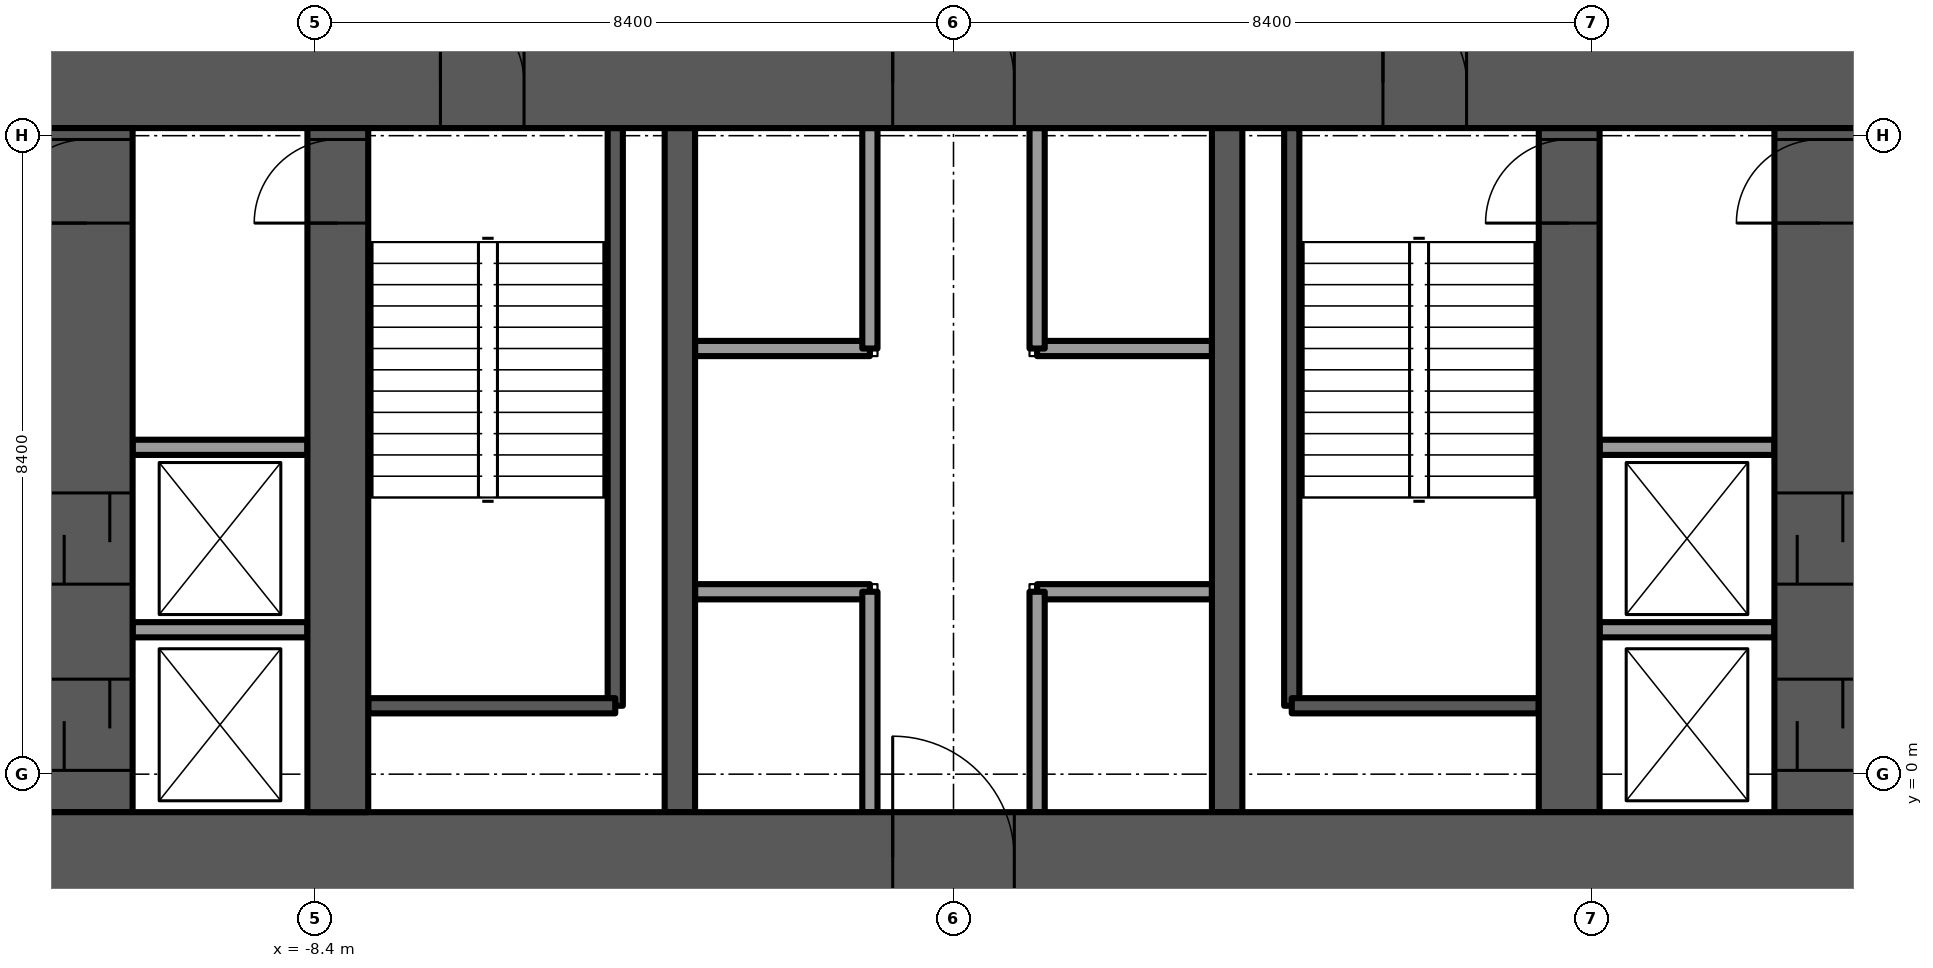
"""IFC4 building model, lengths in metres.
Left out: names, types, materials, properties, quantities, classifications, styles, units other than length and angle.
Written with IfcOpenShell. Run it as: python <this file> out.ifc"""

import sys

from ifc_helpers import new_model, si_unit, direction, frame, frame_2d, origin, place, context, subcontext, project, spatial, rectangle, extrude, element, fill, save


model = new_model("IFC4")
c1 = context("Model", 3, precision=1e-05, world=origin(), true_north=direction((0.0, 1.0)))
c2 = subcontext(c1, "Body", "Model", "MODEL_VIEW")
j1 = project(units=[si_unit("LENGTHUNIT", "METRE"), si_unit("PLANEANGLEUNIT", "RADIAN")], contexts=[c1])
p1 = place(None, origin())
s1 = spatial("IfcSite", under=j1, at=p1, CompositionType="ELEMENT")
p2 = place(p1, origin())
s2 = spatial("IfcBuilding", under=s1, at=p2, CompositionType="ELEMENT")
p3 = place(p2, frame((0.0, 0.0, 19.0)))
s3 = spatial("IfcBuildingStorey", under=s2, at=p3, CompositionType="ELEMENT", Elevation=19.0)
p4 = place(p3, frame((-12.0, -1.1, -0.3), z_axis=(0.0, 0.0, 1.0), x_axis=(1.0, 0.0, 0.0)))
e1 = element("IfcWall", 1, at=p4, inside=s3, PredefinedType="SHEAR", context=c2, shape_type="SweptSolid", body=[
    extrude(rectangle(XDim=24.0, YDim=1.2, at=frame_2d((12.0, 0.0))), origin(), (0.0, 0.0, 1.0), 4.5),
])
p5 = place(p4, frame((11.2, 0.0, 0.0)))
e2 = element("IfcOpeningElement", 2, at=p5, cuts=e1, PredefinedType="OPENING", context=c2, shape_type="SweptSolid", body=[
    extrude(rectangle(XDim=1.6, YDim=2.1, at=frame_2d((0.8, 1.05))), frame((0.0, 0.6, 0.0), z_axis=(0.0, -1.0, 0.0), x_axis=(1.0, 0.0, 0.0)), (0.0, 0.0, 1.0), 1.2),
])
p6 = place(p3, frame((-12.0, 9.1, -0.3), z_axis=(0.0, 0.0, 1.0), x_axis=(1.0, 0.0, 0.0)))
e3 = element("IfcWall", 3, at=p6, inside=s3, PredefinedType="SHEAR", context=c2, shape_type="SweptSolid", body=[
    extrude(rectangle(XDim=24.0, YDim=1.2, at=frame_2d((12.0, 0.0))), origin(), (0.0, 0.0, 1.0), 4.5),
])
p7 = place(p6, frame((11.2, 0.0, 0.0)))
e4 = element("IfcOpeningElement", 4, at=p7, cuts=e3, PredefinedType="OPENING", context=c2, shape_type="SweptSolid", body=[
    extrude(rectangle(XDim=1.6, YDim=2.1, at=frame_2d((0.8, 1.05))), frame((0.0, 0.6, 0.0), z_axis=(0.0, -1.0, 0.0), x_axis=(1.0, 0.0, 0.0)), (0.0, 0.0, 1.0), 1.2),
])
p8 = place(p6, frame((5.25, 0.0, 0.0)))
e5 = element("IfcOpeningElement", 5, at=p8, cuts=e3, PredefinedType="OPENING", context=c2, shape_type="SweptSolid", body=[
    extrude(rectangle(XDim=1.1, YDim=2.1, at=frame_2d((0.55, 1.05))), frame((0.0, 0.6, 0.0), z_axis=(0.0, -1.0, 0.0), x_axis=(1.0, 0.0, 0.0)), (0.0, 0.0, 1.0), 1.2),
])
p9 = place(p6, frame((17.65, 0.0, 0.0)))
e6 = element("IfcOpeningElement", 6, at=p9, cuts=e3, PredefinedType="OPENING", context=c2, shape_type="SweptSolid", body=[
    extrude(rectangle(XDim=1.1, YDim=2.1, at=frame_2d((0.55, 1.05))), frame((0.0, 0.6, 0.0), z_axis=(0.0, -1.0, 0.0), x_axis=(1.0, 0.0, 0.0)), (0.0, 0.0, 1.0), 1.2),
])
p10 = place(p3, frame((-8.1, -0.5, -0.3), z_axis=(0.0, 0.0, 1.0), x_axis=(0.0, 1.0, 0.0)))
e7 = element("IfcWall", 7, at=p10, inside=s3, PredefinedType="SHEAR", context=c2, shape_type="SweptSolid", body=[
    extrude(rectangle(XDim=9.0, YDim=0.8, at=frame_2d((4.5, 0.0))), origin(), (0.0, 0.0, 1.0), 4.5),
])
p11 = place(p10, frame((7.75, 0.0, 0.0)))
e8 = element("IfcOpeningElement", 8, at=p11, cuts=e7, PredefinedType="OPENING", context=c2, shape_type="SweptSolid", body=[
    extrude(rectangle(XDim=1.1, YDim=2.1, at=frame_2d((0.55, 1.05))), frame((0.0, 0.4, 0.0), z_axis=(0.0, -1.0, 0.0), x_axis=(1.0, 0.0, 0.0)), (0.0, 0.0, 1.0), 0.8),
])
p12 = place(p3, frame((8.1, -0.5, -0.3), z_axis=(0.0, 0.0, 1.0), x_axis=(0.0, 1.0, 0.0)))
e9 = element("IfcWall", 9, at=p12, inside=s3, PredefinedType="SHEAR", context=c2, shape_type="SweptSolid", body=[
    extrude(rectangle(XDim=9.0, YDim=0.8, at=frame_2d((4.5, 0.0))), origin(), (0.0, 0.0, 1.0), 4.5),
])
p13 = place(p12, frame((7.75, 0.0, 0.0)))
e10 = element("IfcOpeningElement", 10, at=p13, cuts=e9, PredefinedType="OPENING", context=c2, shape_type="SweptSolid", body=[
    extrude(rectangle(XDim=1.1, YDim=2.1, at=frame_2d((0.55, 1.05))), frame((0.0, 0.4, 0.0), z_axis=(0.0, -1.0, 0.0), x_axis=(1.0, 0.0, 0.0)), (0.0, 0.0, 1.0), 0.8),
])
for number, where, z_axis, x_axis in (
    (11, (-3.6, -0.5, -0.3), (0.0, 0.0, 1.0), (0.0, 1.0, 0.0)),
    (12, (3.6, -0.5, -0.3), (0.0, 0.0, 1.0), (0.0, 1.0, 0.0)),
):
    element("IfcWall", number, at=place(p3, frame(where, z_axis=z_axis, x_axis=x_axis)), inside=s3, PredefinedType="SHEAR", context=c2, shape_type="SweptSolid", body=[
        extrude(rectangle(XDim=9.0, YDim=0.4, at=frame_2d((4.5, 0.0))), origin(), (0.0, 0.0, 1.0), 4.5),
    ])
p14 = place(p3, frame((-11.4, -0.5, -0.3), z_axis=(0.0, 0.0, 1.0), x_axis=(0.0, 1.0, 0.0)))
e13 = element("IfcWall", 13, at=p14, inside=s3, PredefinedType="SHEAR", context=c2, shape_type="SweptSolid", body=[
    extrude(rectangle(XDim=9.0, YDim=1.2, at=frame_2d((4.5, 0.0))), origin(), (0.0, 0.0, 1.0), 4.5),
])
p15 = place(p14, frame((7.75, 0.0, 0.0)))
e14 = element("IfcOpeningElement", 14, at=p15, cuts=e13, PredefinedType="OPENING", context=c2, shape_type="SweptSolid", body=[
    extrude(rectangle(XDim=1.1, YDim=2.1, at=frame_2d((0.55, 1.05))), frame((0.0, 0.6, 0.0), z_axis=(0.0, -1.0, 0.0), x_axis=(1.0, 0.0, 0.0)), (0.0, 0.0, 1.0), 1.2),
])
p16 = place(p14, frame((0.55, 0.0, 0.0)))
e15 = element("IfcOpeningElement", 15, at=p16, cuts=e13, PredefinedType="OPENING", context=c2, shape_type="SweptSolid", body=[
    extrude(rectangle(XDim=1.2, YDim=2.1, at=frame_2d((0.6, 1.05))), frame((0.0, 0.6, 0.0), z_axis=(0.0, -1.0, 0.0), x_axis=(1.0, 0.0, 0.0)), (0.0, 0.0, 1.0), 1.2),
])
p17 = place(p14, frame((3.0, 0.0, 0.0)))
e16 = element("IfcOpeningElement", 16, at=p17, cuts=e13, PredefinedType="OPENING", context=c2, shape_type="SweptSolid", body=[
    extrude(rectangle(XDim=1.2, YDim=2.1, at=frame_2d((0.6, 1.05))), frame((0.0, 0.6, 0.0), z_axis=(0.0, -1.0, 0.0), x_axis=(1.0, 0.0, 0.0)), (0.0, 0.0, 1.0), 1.2),
])
p18 = place(p3, frame((11.4, -0.5, -0.3), z_axis=(0.0, 0.0, 1.0), x_axis=(0.0, 1.0, 0.0)))
e17 = element("IfcWall", 17, at=p18, inside=s3, PredefinedType="SHEAR", context=c2, shape_type="SweptSolid", body=[
    extrude(rectangle(XDim=9.0, YDim=1.2, at=frame_2d((4.5, 0.0))), origin(), (0.0, 0.0, 1.0), 4.5),
])
p19 = place(p18, frame((7.75, 0.0, 0.0)))
e18 = element("IfcOpeningElement", 18, at=p19, cuts=e17, PredefinedType="OPENING", context=c2, shape_type="SweptSolid", body=[
    extrude(rectangle(XDim=1.1, YDim=2.1, at=frame_2d((0.55, 1.05))), frame((0.0, 0.6, 0.0), z_axis=(0.0, -1.0, 0.0), x_axis=(1.0, 0.0, 0.0)), (0.0, 0.0, 1.0), 1.2),
])
p20 = place(p18, frame((0.55, 0.0, 0.0)))
e19 = element("IfcOpeningElement", 19, at=p20, cuts=e17, PredefinedType="OPENING", context=c2, shape_type="SweptSolid", body=[
    extrude(rectangle(XDim=1.2, YDim=2.1, at=frame_2d((0.6, 1.05))), frame((0.0, 0.6, 0.0), z_axis=(0.0, -1.0, 0.0), x_axis=(1.0, 0.0, 0.0)), (0.0, 0.0, 1.0), 1.2),
])
p21 = place(p18, frame((3.0, 0.0, 0.0)))
e20 = element("IfcOpeningElement", 20, at=p21, cuts=e17, PredefinedType="OPENING", context=c2, shape_type="SweptSolid", body=[
    extrude(rectangle(XDim=1.2, YDim=2.1, at=frame_2d((0.6, 1.05))), frame((0.0, 0.6, 0.0), z_axis=(0.0, -1.0, 0.0), x_axis=(1.0, 0.0, 0.0)), (0.0, 0.0, 1.0), 1.2),
])
for number, where, z_axis, x_axis in (
    (21, (-3.4, 2.4, 0.0), (0.0, 0.0, 1.0), (1.0, 0.0, 0.0)),
    (22, (-3.4, 5.6, 0.0), (0.0, 0.0, 1.0), (1.0, 0.0, 0.0)),
    (23, (1.1, 2.4, 0.0), (0.0, 0.0, 1.0), (1.0, 0.0, 0.0)),
    (24, (1.1, 5.6, 0.0), (0.0, 0.0, 1.0), (1.0, 0.0, 0.0)),
):
    element("IfcWall", number, at=place(p3, frame(where, z_axis=z_axis, x_axis=x_axis)), inside=s3, PredefinedType="PARTITIONING", context=c2, shape_type="SweptSolid", body=[
        extrude(rectangle(XDim=2.3, YDim=0.2, at=frame_2d((1.15, 0.0))), origin(), (0.0, 0.0, 1.0), 4.2),
    ])
for number, where, z_axis, x_axis in (
    (25, (-1.1, -0.5, 0.0), (0.0, 0.0, 1.0), (0.0, 1.0, 0.0)),
    (26, (1.1, -0.5, 0.0), (0.0, 0.0, 1.0), (0.0, 1.0, 0.0)),
    (27, (-1.1, 5.6, 0.0), (0.0, 0.0, 1.0), (0.0, 1.0, 0.0)),
    (28, (1.1, 5.6, 0.0), (0.0, 0.0, 1.0), (0.0, 1.0, 0.0)),
):
    element("IfcWall", number, at=place(p3, frame(where, z_axis=z_axis, x_axis=x_axis)), inside=s3, PredefinedType="PARTITIONING", context=c2, shape_type="SweptSolid", body=[
        extrude(rectangle(XDim=2.9, YDim=0.2, at=frame_2d((1.45, 0.0))), origin(), (0.0, 0.0, 1.0), 4.2),
    ])
p22 = place(p3, frame((-4.45, 0.9, -0.3), z_axis=(0.0, 0.0, 1.0), x_axis=(0.0, 1.0, 0.0)))
e29 = element("IfcWall", 29, at=p22, inside=s3, PredefinedType="SOLIDWALL", context=c2, shape_type="SweptSolid", body=[
    extrude(rectangle(XDim=7.6, YDim=0.2, at=frame_2d((3.8, 0.0))), origin(), (0.0, 0.0, 1.0), 4.5),
])
p23 = place(p3, frame((-7.7, 0.9, -0.3), z_axis=(0.0, 0.0, 1.0), x_axis=(1.0, 0.0, 0.0)))
e30 = element("IfcWall", 30, at=p23, inside=s3, PredefinedType="SOLIDWALL", context=c2, shape_type="SweptSolid", body=[
    extrude(rectangle(XDim=3.25, YDim=0.2, at=frame_2d((1.625, 0.0))), origin(), (0.0, 0.0, 1.0), 4.5),
])
p24 = place(p3, frame((4.45, 0.9, -0.3), z_axis=(0.0, 0.0, 1.0), x_axis=(0.0, 1.0, 0.0)))
e31 = element("IfcWall", 31, at=p24, inside=s3, PredefinedType="SOLIDWALL", context=c2, shape_type="SweptSolid", body=[
    extrude(rectangle(XDim=7.6, YDim=0.2, at=frame_2d((3.8, 0.0))), origin(), (0.0, 0.0, 1.0), 4.5),
])
p25 = place(p3, frame((4.45, 0.9, -0.3), z_axis=(0.0, 0.0, 1.0), x_axis=(1.0, 0.0, 0.0)))
e32 = element("IfcWall", 32, at=p25, inside=s3, PredefinedType="SOLIDWALL", context=c2, shape_type="SweptSolid", body=[
    extrude(rectangle(XDim=3.25, YDim=0.2, at=frame_2d((1.625, 0.0))), origin(), (0.0, 0.0, 1.0), 4.5),
])
for number, where, z_axis, x_axis in (
    (33, (-10.8, 1.9, 0.0), (0.0, 0.0, 1.0), (1.0, 0.0, 0.0)),
    (34, (-10.8, 4.3, 0.0), (0.0, 0.0, 1.0), (1.0, 0.0, 0.0)),
    (35, (8.5, 1.9, 0.0), (0.0, 0.0, 1.0), (1.0, 0.0, 0.0)),
    (36, (8.5, 4.3, 0.0), (0.0, 0.0, 1.0), (1.0, 0.0, 0.0)),
):
    element("IfcWall", number, at=place(p3, frame(where, z_axis=z_axis, x_axis=x_axis)), inside=s3, PredefinedType="PARTITIONING", context=c2, shape_type="SweptSolid", body=[
        extrude(rectangle(XDim=2.3, YDim=0.2, at=frame_2d((1.15, 0.0))), origin(), (0.0, 0.0, 1.0), 4.2),
    ])
p26 = place(p5, origin())
e37 = element("IfcDoor", 37, at=p26, inside=s3, OperationType="DOUBLE_DOOR_SINGLE_SWING", PredefinedType="DOOR", context=c2, shape_type="SweptSolid", body=[
    extrude(rectangle(XDim=1.6, YDim=2.1, at=frame_2d((0.8, 1.05))), frame((0.0, 0.025, 0.0), z_axis=(0.0, -1.0, 0.0), x_axis=(1.0, 0.0, 0.0)), (0.0, 0.0, 1.0), 0.05),
])
fill(e2, e37)
p27 = place(p7, origin())
e38 = element("IfcDoor", 38, at=p27, inside=s3, OperationType="DOUBLE_DOOR_SINGLE_SWING", PredefinedType="DOOR", context=c2, shape_type="SweptSolid", body=[
    extrude(rectangle(XDim=1.6, YDim=2.1, at=frame_2d((0.8, 1.05))), frame((0.0, 0.025, 0.0), z_axis=(0.0, -1.0, 0.0), x_axis=(1.0, 0.0, 0.0)), (0.0, 0.0, 1.0), 0.05),
])
fill(e4, e38)
p28 = place(p8, origin())
e39 = element("IfcDoor", 39, at=p28, inside=s3, OperationType="SINGLE_SWING_LEFT", PredefinedType="DOOR", context=c2, shape_type="SweptSolid", body=[
    extrude(rectangle(XDim=1.1, YDim=2.1, at=frame_2d((0.55, 1.05))), frame((0.0, 0.025, 0.0), z_axis=(0.0, -1.0, 0.0), x_axis=(1.0, 0.0, 0.0)), (0.0, 0.0, 1.0), 0.05),
])
fill(e5, e39)
p29 = place(p11, origin())
e40 = element("IfcDoor", 40, at=p29, inside=s3, OperationType="SINGLE_SWING_RIGHT", PredefinedType="DOOR", context=c2, shape_type="SweptSolid", body=[
    extrude(rectangle(XDim=1.1, YDim=2.1, at=frame_2d((0.55, 1.05))), frame((0.0, 0.025, 0.0), z_axis=(0.0, -1.0, 0.0), x_axis=(1.0, 0.0, 0.0)), (0.0, 0.0, 1.0), 0.05),
])
fill(e8, e40)
p30 = place(p9, origin())
e41 = element("IfcDoor", 41, at=p30, inside=s3, OperationType="SINGLE_SWING_RIGHT", PredefinedType="DOOR", context=c2, shape_type="SweptSolid", body=[
    extrude(rectangle(XDim=1.1, YDim=2.1, at=frame_2d((0.55, 1.05))), frame((0.0, 0.025, 0.0), z_axis=(0.0, -1.0, 0.0), x_axis=(1.0, 0.0, 0.0)), (0.0, 0.0, 1.0), 0.05),
])
fill(e6, e41)
p31 = place(p13, origin())
e42 = element("IfcDoor", 42, at=p31, inside=s3, OperationType="SINGLE_SWING_LEFT", PredefinedType="DOOR", context=c2, shape_type="SweptSolid", body=[
    extrude(rectangle(XDim=1.1, YDim=2.1, at=frame_2d((0.55, 1.05))), frame((0.0, 0.025, 0.0), z_axis=(0.0, -1.0, 0.0), x_axis=(1.0, 0.0, 0.0)), (0.0, 0.0, 1.0), 0.05),
])
fill(e10, e42)
p32 = place(p15, origin())
e43 = element("IfcDoor", 43, at=p32, inside=s3, OperationType="SINGLE_SWING_LEFT", PredefinedType="DOOR", context=c2, shape_type="SweptSolid", body=[
    extrude(rectangle(XDim=1.1, YDim=2.1, at=frame_2d((0.55, 1.05))), frame((0.0, 0.025, 0.0), z_axis=(0.0, -1.0, 0.0), x_axis=(1.0, 0.0, 0.0)), (0.0, 0.0, 1.0), 0.05),
])
fill(e14, e43)
p33 = place(p16, origin())
e44 = element("IfcDoor", 44, at=p33, inside=s3, OperationType="SLIDING_TO_LEFT", PredefinedType="DOOR", context=c2, shape_type="SweptSolid", body=[
    extrude(rectangle(XDim=1.2, YDim=2.1, at=frame_2d((0.6, 1.05))), frame((0.0, 0.025, 0.0), z_axis=(0.0, -1.0, 0.0), x_axis=(1.0, 0.0, 0.0)), (0.0, 0.0, 1.0), 0.05),
])
fill(e15, e44)
p34 = place(p17, origin())
e45 = element("IfcDoor", 45, at=p34, inside=s3, OperationType="SLIDING_TO_LEFT", PredefinedType="DOOR", context=c2, shape_type="SweptSolid", body=[
    extrude(rectangle(XDim=1.2, YDim=2.1, at=frame_2d((0.6, 1.05))), frame((0.0, 0.025, 0.0), z_axis=(0.0, -1.0, 0.0), x_axis=(1.0, 0.0, 0.0)), (0.0, 0.0, 1.0), 0.05),
])
fill(e16, e45)
p35 = place(p19, origin())
e46 = element("IfcDoor", 46, at=p35, inside=s3, OperationType="SINGLE_SWING_RIGHT", PredefinedType="DOOR", context=c2, shape_type="SweptSolid", body=[
    extrude(rectangle(XDim=1.1, YDim=2.1, at=frame_2d((0.55, 1.05))), frame((0.0, 0.025, 0.0), z_axis=(0.0, -1.0, 0.0), x_axis=(1.0, 0.0, 0.0)), (0.0, 0.0, 1.0), 0.05),
])
fill(e18, e46)
p36 = place(p20, origin())
e47 = element("IfcDoor", 47, at=p36, inside=s3, OperationType="SLIDING_TO_LEFT", PredefinedType="DOOR", context=c2, shape_type="SweptSolid", body=[
    extrude(rectangle(XDim=1.2, YDim=2.1, at=frame_2d((0.6, 1.05))), frame((0.0, 0.025, 0.0), z_axis=(0.0, -1.0, 0.0), x_axis=(1.0, 0.0, 0.0)), (0.0, 0.0, 1.0), 0.05),
])
fill(e19, e47)
p37 = place(p21, origin())
e48 = element("IfcDoor", 48, at=p37, inside=s3, OperationType="SLIDING_TO_LEFT", PredefinedType="DOOR", context=c2, shape_type="SweptSolid", body=[
    extrude(rectangle(XDim=1.2, YDim=2.1, at=frame_2d((0.6, 1.05))), frame((0.0, 0.025, 0.0), z_axis=(0.0, -1.0, 0.0), x_axis=(1.0, 0.0, 0.0)), (0.0, 0.0, 1.0), 0.05),
])
fill(e20, e48)
save(model, sys.argv[1])
